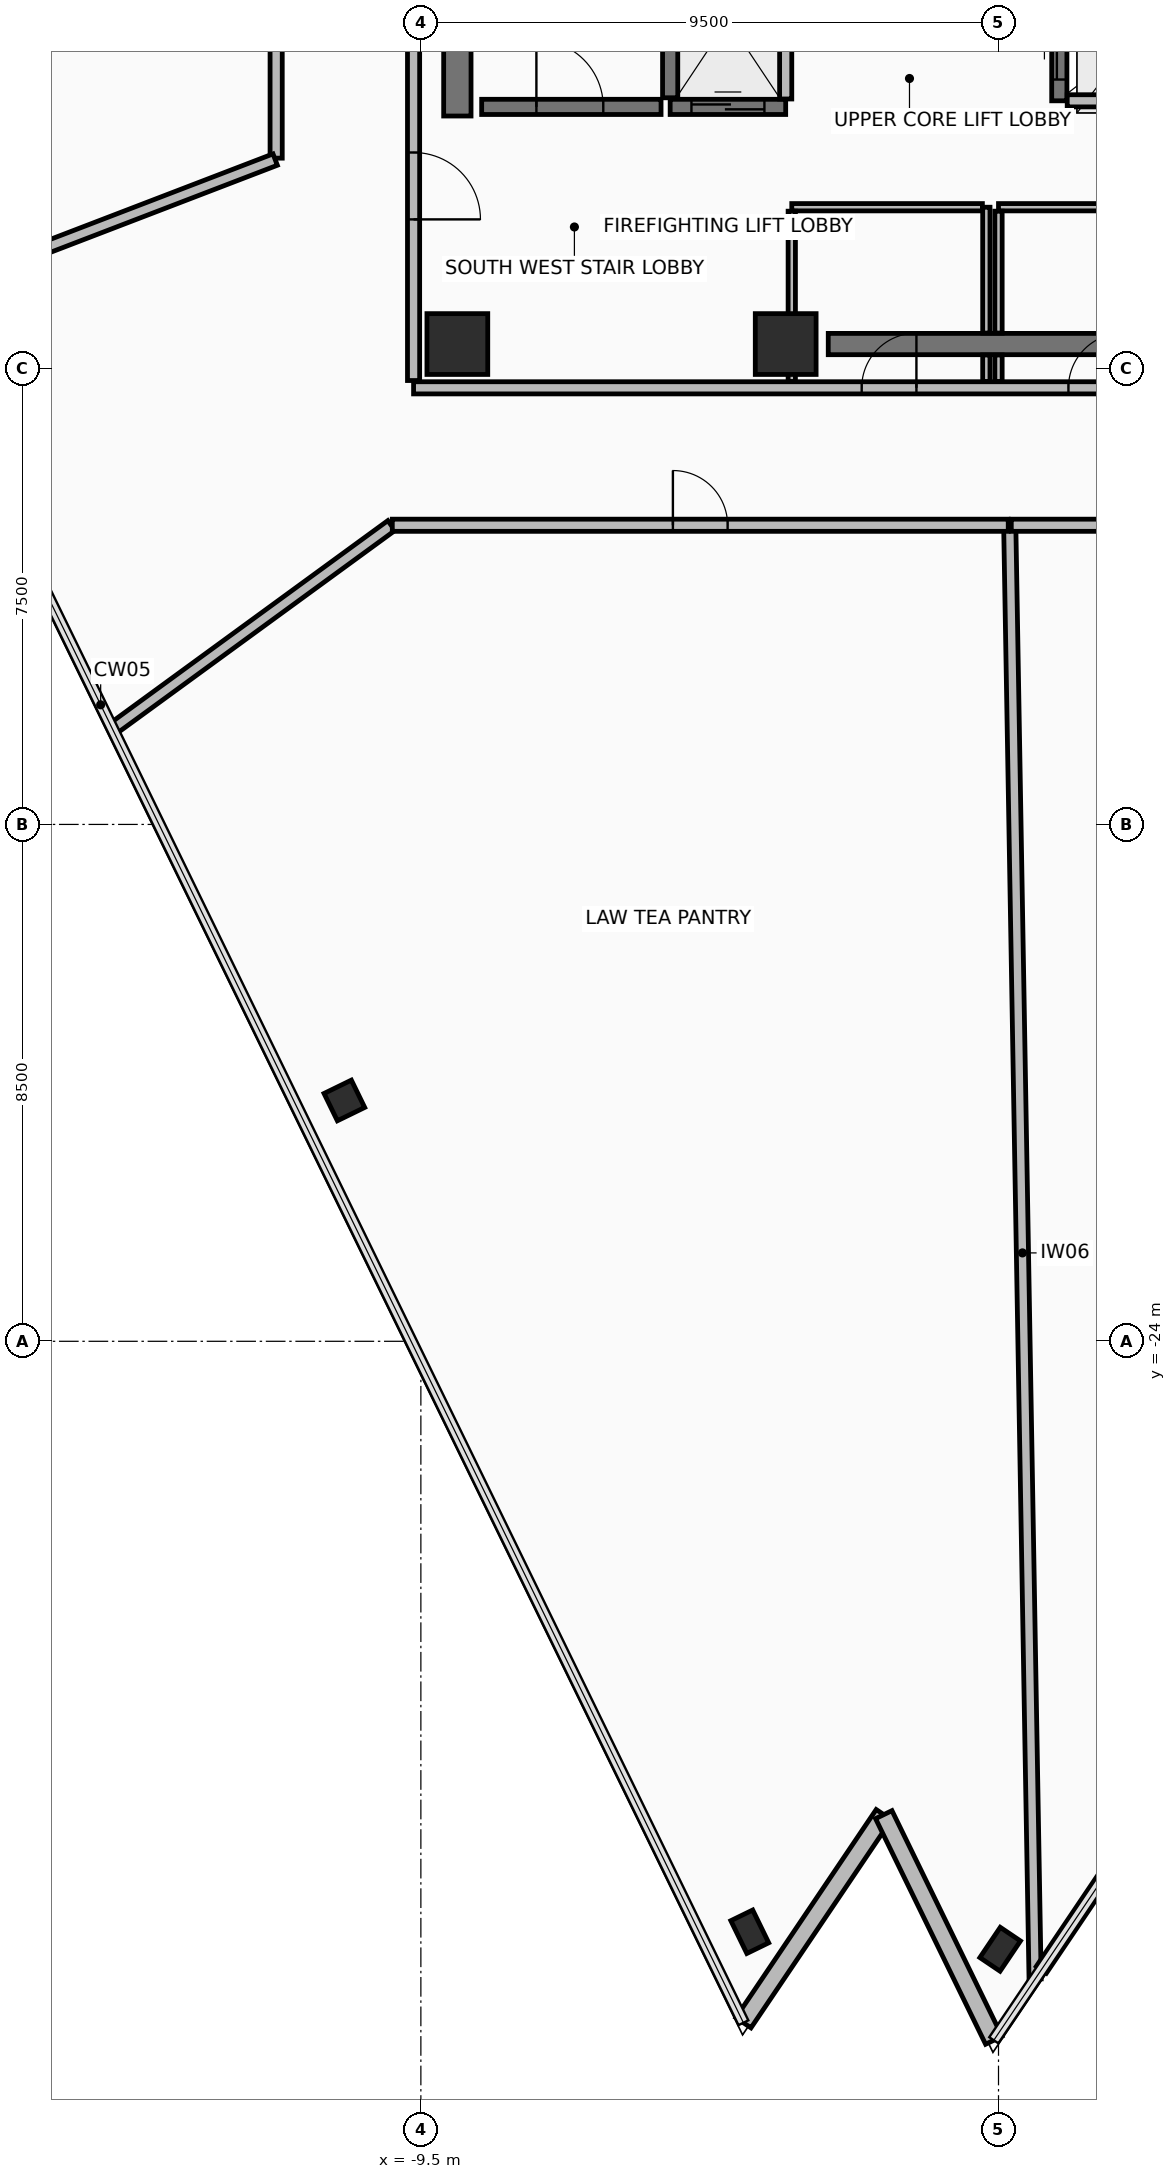
"""IFC4 building model, lengths in metres.
Left out: names, types, materials, properties, quantities, classifications, styles, units other than length and angle.
Written with IfcOpenShell. Run it as: python <this file> out.ifc"""

import sys

from ifc_helpers import new_model, si_unit, direction, frame, frame_2d, origin, origin_2d, place, context, subcontext, project, spatial, rectangle, hollow_rectangle, extrude, element, fill, save


model = new_model("IFC4")
c1 = context("Model", 3, precision=1e-05, world=origin(), true_north=direction((0.0, 1.0)))
c2 = subcontext(c1, "Body", "Model", "MODEL_VIEW")
j1 = project(units=[si_unit("LENGTHUNIT", "METRE"), si_unit("PLANEANGLEUNIT", "RADIAN")], contexts=[c1])
p1 = place(None, origin())
s1 = spatial("IfcSite", under=j1, at=p1, CompositionType="ELEMENT")
p2 = place(p1, origin())
s2 = spatial("IfcBuilding", under=s1, at=p2, CompositionType="ELEMENT")
p3 = place(p2, frame((0.0, 0.0, 241.45)))
s3 = spatial("IfcBuildingStorey", under=s2, at=p3, CompositionType="ELEMENT", Elevation=241.45)
for number, where, z_axis, x_axis in (
    (1, (-8.9, -7.6, 0.0), (0.0, 0.0, 1.0), (1.0, 0.0, 0.0)),
    (2, (-3.5, -7.6, 0.0), (0.0, 0.0, 1.0), (1.0, 0.0, 0.0)),
):
    element("IfcColumn", number, at=place(p3, frame(where, z_axis=z_axis, x_axis=x_axis)), inside=s3, PredefinedType="COLUMN", context=c2, shape_type="SweptSolid", body=[
        extrude(rectangle(XDim=1.0, YDim=1.0, at=origin_2d()), origin(), (0.0, 0.0, 1.0), 3.6),
    ])
p4 = place(p3, frame((-10.758, -20.039, 0.0), z_axis=(0.0, 0.0, 1.0), x_axis=(-0.438371146789, 0.898794046299, 0.0)))
e3 = element("IfcColumn", 3, at=p4, inside=s3, PredefinedType="COLUMN", context=c2, shape_type="SweptSolid", body=[
    extrude(hollow_rectangle(XDim=0.5, YDim=0.5, WallThickness=0.032, at=origin_2d()), origin(), (0.0, 0.0, 1.0), 3.6),
])
for number, where, z_axis, x_axis in (
    (4, (-4.091, -33.71, 0.0), (0.0, 0.0, 1.0), (-0.438, 0.899, 0.0)),
    (5, (0.027, -33.998, 0.0), (0.0, 0.0, 1.0), (0.559, 0.829, 0.0)),
):
    element("IfcColumn", number, at=place(p3, frame(where, z_axis=z_axis, x_axis=x_axis)), inside=s3, PredefinedType="COLUMN", context=c2, shape_type="SweptSolid", body=[
        extrude(hollow_rectangle(XDim=0.4, YDim=0.6, WallThickness=0.03, at=origin_2d()), origin(), (0.0, 0.0, 1.0), 3.6),
    ])
p5 = place(p3, frame((-4.195, -35.207, 0.0), z_axis=(0.0, 0.0, 1.0), x_axis=(0.559182319101, 0.829044711704, 0.0)))
e6 = element("IfcWall", 6, at=p5, inside=s3, PredefinedType="STANDARD", context=c2, shape_type="SweptSolid", body=[
    extrude(rectangle(XDim=4.128, YDim=0.3, at=frame_2d((2.064, 0.0))), origin(), (0.0, 0.0, 1.0), 2.765),
])
p6 = place(p3, frame((-1.887, -31.784, 0.0), z_axis=(0.0, 0.0, 1.0), x_axis=(0.438367699713, -0.898795727542, 0.0)))
e7 = element("IfcWall", 7, at=p6, inside=s3, PredefinedType="STANDARD", context=c2, shape_type="SweptSolid", body=[
    extrude(rectangle(XDim=4.128, YDim=0.3, at=frame_2d((2.064, 0.0))), origin(), (0.0, 0.0, 1.0), 2.765),
])
p7 = place(p3, frame((-2.8, -7.6, 0.0), z_axis=(0.0, 0.0, 1.0), x_axis=(1.0, 0.0, 0.0)))
e8 = element("IfcWall", 8, at=p7, inside=s3, PredefinedType="SHEAR", context=c2, shape_type="SweptSolid", body=[
    extrude(rectangle(XDim=5.38, YDim=0.35, at=frame_2d((2.69, 0.0))), origin(), (0.0, 0.0, 1.0), 3.42),
])
p8 = place(p3, frame((-8.9, -3.85, 0.0), z_axis=(0.0, 0.0, 1.0), x_axis=(0.0, 1.0, 0.0)))
e9 = element("IfcWall", 9, at=p8, inside=s3, PredefinedType="SHEAR", context=c2, shape_type="SweptSolid", body=[
    extrude(rectangle(XDim=10.7, YDim=0.45, at=frame_2d((5.35, 0.0))), origin(), (0.0, 0.0, 1.0), 3.42),
])
p9 = place(p3, frame((-9.62, -8.32, 0.0), z_axis=(0.0, 0.0, 1.0), x_axis=(1.0, 0.0, 0.0)))
e10 = element("IfcWall", 10, at=p9, inside=s3, PredefinedType="PARTITIONING", context=c2, shape_type="SweptSolid", body=[
    extrude(rectangle(XDim=19.24, YDim=0.2, at=frame_2d((9.62, 0.0))), origin(), (0.0, 0.0, 1.0), 2.915),
])
p10 = place(p9, frame((7.37, 0.0, 0.0)))
e11 = element("IfcOpeningElement", 11, at=p10, cuts=e10, PredefinedType="OPENING", context=c2, shape_type="SweptSolid", body=[
    extrude(rectangle(XDim=0.9, YDim=2.1, at=frame_2d((0.45, 1.05))), frame((0.0, 0.11, 0.0), z_axis=(0.0, -1.0, 0.0), x_axis=(1.0, 0.0, 0.0)), (0.0, 0.0, 1.0), 0.22),
])
p11 = place(p9, frame((10.77, 0.0, 0.0)))
e12 = element("IfcOpeningElement", 12, at=p11, cuts=e10, PredefinedType="OPENING", context=c2, shape_type="SweptSolid", body=[
    extrude(rectangle(XDim=0.9, YDim=2.1, at=frame_2d((0.45, 1.05))), frame((0.0, 0.11, 0.0), z_axis=(0.0, -1.0, 0.0), x_axis=(1.0, 0.0, 0.0)), (0.0, 0.0, 1.0), 0.22),
])
p12 = place(p3, frame((-9.62, 8.2, 0.0), z_axis=(0.0, 0.0, 1.0), x_axis=(0.0, -1.0, 0.0)))
e13 = element("IfcWall", 13, at=p12, inside=s3, PredefinedType="PARTITIONING", context=c2, shape_type="SweptSolid", body=[
    extrude(rectangle(XDim=16.4, YDim=0.2, at=frame_2d((8.2, 0.0))), origin(), (0.0, 0.0, 1.0), 2.765),
])
p13 = place(p12, frame((12.65, 0.0, 0.0)))
e14 = element("IfcOpeningElement", 14, at=p13, cuts=e13, PredefinedType="OPENING", context=c2, shape_type="SweptSolid", body=[
    extrude(rectangle(XDim=1.1, YDim=2.15, at=frame_2d((0.55, 1.075))), frame((0.0, 0.11, 0.0), z_axis=(0.0, -1.0, 0.0), x_axis=(1.0, 0.0, 0.0)), (0.0, 0.0, 1.0), 0.22),
])
p14 = place(p3, frame((-5.4, -3.55, 0.0), z_axis=(0.0, 0.0, 1.0), x_axis=(0.0, 1.0, 0.0)))
e15 = element("IfcWall", 15, at=p14, inside=s3, PredefinedType="SHEAR", context=c2, shape_type="SweptSolid", body=[
    extrude(rectangle(XDim=7.3, YDim=0.25, at=frame_2d((3.65, 0.0))), origin(), (0.0, 0.0, 1.0), 3.42),
])
p15 = place(p3, frame((-8.5, -3.7, 0.0), z_axis=(0.0, 0.0, 1.0), x_axis=(1.0, 0.0, 0.0)))
e16 = element("IfcWall", 16, at=p15, inside=s3, PredefinedType="SHEAR", context=c2, shape_type="SweptSolid", body=[
    extrude(rectangle(XDim=2.95, YDim=0.25, at=frame_2d((1.475, 0.0))), origin(), (0.0, 0.0, 1.0), 3.42),
])
p16 = place(p15, frame((0.9, 0.0, 0.0)))
e17 = element("IfcOpeningElement", 17, at=p16, cuts=e16, PredefinedType="OPENING", context=c2, shape_type="SweptSolid", body=[
    extrude(rectangle(XDim=1.1, YDim=2.15, at=frame_2d((0.55, 1.075))), frame((0.0, 0.135, 0.0), z_axis=(0.0, -1.0, 0.0), x_axis=(1.0, 0.0, 0.0)), (0.0, 0.0, 1.0), 0.27),
])
p17 = place(p3, frame((1.0, -3.6, 0.0), z_axis=(0.0, 0.0, 1.0), x_axis=(0.0, 1.0, 0.0)))
e18 = element("IfcWall", 18, at=p17, inside=s3, PredefinedType="SHEAR", context=c2, shape_type="SweptSolid", body=[
    extrude(rectangle(XDim=1.8, YDim=0.25, at=frame_2d((0.9, 0.0))), origin(), (0.0, 0.0, 1.0), 3.42),
])
p18 = place(p17, frame((0.35, 0.0, 0.0)))
e19 = element("IfcOpeningElement", 19, at=p18, cuts=e18, PredefinedType="OPENING", context=c2, shape_type="SweptSolid", body=[
    extrude(rectangle(XDim=1.1, YDim=2.2, at=frame_2d((0.55, 1.1))), frame((0.0, 0.135, 0.0), z_axis=(0.0, -1.0, 0.0), x_axis=(1.0, 0.0, 0.0)), (0.0, 0.0, 1.0), 0.27),
])
p19 = place(p3, frame((1.13, -3.6, 0.0), z_axis=(0.0, 0.0, 1.0), x_axis=(1.0, 0.0, 0.0)))
e20 = element("IfcWall", 20, at=p19, inside=s3, PredefinedType="PARTITIONING", context=c2, shape_type="SweptSolid", body=[
    extrude(rectangle(XDim=2.045, YDim=0.2, at=frame_2d((1.022, 0.0))), origin(), (0.0, 0.0, 1.0), 3.42),
])
p20 = place(p3, frame((-5.4, -3.7, 0.0), z_axis=(0.0, 0.0, 1.0), x_axis=(1.0, 0.0, 0.0)))
e21 = element("IfcWall", 21, at=p20, inside=s3, PredefinedType="SHEAR", context=c2, shape_type="SweptSolid", body=[
    extrude(rectangle(XDim=1.9, YDim=0.25, at=frame_2d((0.95, 0.0))), origin(), (0.0, 0.0, 1.0), 3.42),
])
p21 = place(p20, frame((0.35, 0.0, 0.0)))
e22 = element("IfcOpeningElement", 22, at=p21, cuts=e21, PredefinedType="OPENING", context=c2, shape_type="SweptSolid", body=[
    extrude(rectangle(XDim=1.2, YDim=2.2, at=frame_2d((0.6, 1.1))), frame((0.0, 0.135, 0.0), z_axis=(0.0, -1.0, 0.0), x_axis=(1.0, 0.0, 0.0)), (0.0, 0.0, 1.0), 0.27),
])
p22 = place(p3, frame((-3.5, -3.57, 0.0), z_axis=(0.0, 0.0, 1.0), x_axis=(0.0, 1.0, 0.0)))
e23 = element("IfcWall", 23, at=p22, inside=s3, PredefinedType="PARTITIONING", context=c2, shape_type="SweptSolid", body=[
    extrude(rectangle(XDim=2.615, YDim=0.2, at=frame_2d((1.308, 0.0))), origin(), (0.0, 0.0, 1.0), 3.42),
])
p23 = place(p3, frame((-0.2, -8.215, 0.0), z_axis=(0.0, 0.0, 1.0), x_axis=(0.0, 1.0, 0.0)))
e24 = element("IfcWall", 24, at=p23, inside=s3, PredefinedType="PARTITIONING", context=c2, shape_type="SweptSolid", body=[
    extrude(rectangle(XDim=0.435, YDim=0.12, at=frame_2d((0.218, 0.0))), origin(), (0.0, 0.0, 1.0), 2.715),
])
p24 = place(p3, frame((-0.2, -7.42, 0.0), z_axis=(0.0, 0.0, 1.0), x_axis=(0.0, 1.0, 0.0)))
e25 = element("IfcWall", 25, at=p24, inside=s3, PredefinedType="PARTITIONING", context=c2, shape_type="SweptSolid", body=[
    extrude(rectangle(XDim=2.07, YDim=0.12, at=frame_2d((1.035, 0.0))), origin(), (0.0, 0.0, 1.0), 2.715),
])
p25 = place(p3, frame((-0.265, -5.35, 0.0), z_axis=(0.0, 0.0, 1.0), x_axis=(-1.0, 0.0, 0.0)))
e26 = element("IfcWall", 26, at=p25, inside=s3, PredefinedType="PARTITIONING", context=c2, shape_type="SweptSolid", body=[
    extrude(rectangle(XDim=3.135, YDim=0.12, at=frame_2d((1.567, 0.0))), origin(), (0.0, 0.0, 1.0), 2.715),
])
p26 = place(p3, frame((-3.4, -5.415, 0.0), z_axis=(0.0, 0.0, 1.0), x_axis=(0.0, -1.0, 0.0)))
e27 = element("IfcWall", 27, at=p26, inside=s3, PredefinedType="PARTITIONING", context=c2, shape_type="SweptSolid", body=[
    extrude(rectangle(XDim=2.8, YDim=0.12, at=frame_2d((1.4, 0.0))), origin(), (0.0, 0.0, 1.0), 2.715),
])
p27 = place(p3, frame((3.135, -5.35, 0.0), z_axis=(0.0, 0.0, 1.0), x_axis=(-1.0, 0.0, 0.0)))
e28 = element("IfcWall", 28, at=p27, inside=s3, PredefinedType="PARTITIONING", context=c2, shape_type="SweptSolid", body=[
    extrude(rectangle(XDim=3.135, YDim=0.12, at=frame_2d((1.567, 0.0))), origin(), (0.0, 0.0, 1.0), 3.42),
])
p28 = place(p3, frame((0.0, -5.415, 0.0), z_axis=(0.0, 0.0, 1.0), x_axis=(0.0, -1.0, 0.0)))
e29 = element("IfcWall", 29, at=p28, inside=s3, PredefinedType="PARTITIONING", context=c2, shape_type="SweptSolid", body=[
    extrude(rectangle(XDim=2.005, YDim=0.12, at=frame_2d((1.002, 0.0))), origin(), (0.0, 0.0, 1.0), 2.715),
])
p29 = place(p3, frame((0.0, -7.78, 0.0), z_axis=(0.0, 0.0, 1.0), x_axis=(0.0, -1.0, 0.0)))
e30 = element("IfcWall", 30, at=p29, inside=s3, PredefinedType="PARTITIONING", context=c2, shape_type="SweptSolid", body=[
    extrude(rectangle(XDim=0.435, YDim=0.12, at=frame_2d((0.218, 0.0))), origin(), (0.0, 0.0, 1.0), 2.715),
])
p30 = place(p3, frame((0.602, -34.487, 0.0), z_axis=(0.0, 0.0, 1.0), x_axis=(-0.017457980956, 0.999847597837, 0.0)))
e31 = element("IfcWall", 31, at=p30, inside=s3, PredefinedType="PARTITIONING", context=c2, shape_type="SweptSolid", body=[
    extrude(rectangle(XDim=23.885, YDim=0.2, at=frame_2d((11.943, 0.0))), origin(), (0.0, 0.0, 1.0), 2.765),
])
p31 = place(p3, frame((0.21, -10.58, 0.0), z_axis=(0.0, 0.0, 1.0), x_axis=(1.0, 0.0, 0.0)))
e32 = element("IfcWall", 32, at=p31, inside=s3, PredefinedType="PARTITIONING", context=c2, shape_type="SweptSolid", body=[
    extrude(rectangle(XDim=9.76, YDim=0.2, at=frame_2d((4.88, 0.0))), origin(), (0.0, 0.0, 1.0), 2.915),
])
p32 = place(p31, frame((4.455, 0.0, 0.0)))
e33 = element("IfcOpeningElement", 33, at=p32, cuts=e32, PredefinedType="OPENING", context=c2, shape_type="SweptSolid", body=[
    extrude(rectangle(XDim=0.85, YDim=2.1, at=frame_2d((0.425, 1.05))), frame((0.0, 0.11, 0.0), z_axis=(0.0, -1.0, 0.0), x_axis=(1.0, 0.0, 0.0)), (0.0, 0.0, 1.0), 0.22),
])
p33 = place(p3, frame((14.491, -13.896, 0.0), z_axis=(0.0, 0.0, 1.0), x_axis=(-0.559191528364, -0.829038500074, 0.0)))
e34 = element("IfcWall", 34, at=p33, inside=s3, PredefinedType="PARTITIONING", context=c2, shape_type="SweptSolid", body=[
    extrude(rectangle(XDim=24.655, YDim=0.2, at=frame_2d((12.328, 0.0))), origin(), (0.0, 0.0, 1.0), 3.42),
])
p34 = place(p3, frame((-11.88, 10.579, 0.0), z_axis=(0.0, 0.0, 1.0), x_axis=(0.0, -1.0, 0.0)))
e35 = element("IfcWall", 35, at=p34, inside=s3, PredefinedType="PARTITIONING", context=c2, shape_type="SweptSolid", body=[
    extrude(rectangle(XDim=15.123, YDim=0.2, at=frame_2d((7.561, 0.0))), origin(), (0.0, 0.0, 1.0), 2.765),
])
p35 = place(p34, frame((7.061, 0.0, 0.0)))
e36 = element("IfcOpeningElement", 36, at=p35, cuts=e35, PredefinedType="OPENING", context=c2, shape_type="SweptSolid", body=[
    extrude(rectangle(XDim=1.0, YDim=2.15, at=frame_2d((0.5, 1.075))), frame((0.0, 0.11, 0.0), z_axis=(0.0, -1.0, 0.0), x_axis=(1.0, 0.0, 0.0)), (0.0, 0.0, 1.0), 0.22),
])
p36 = place(p3, frame((-11.896, -4.566, 0.0), z_axis=(0.0, 0.0, 1.0), x_axis=(-0.933585017774, -0.358355988632, 0.0)))
e37 = element("IfcWall", 37, at=p36, inside=s3, PredefinedType="PARTITIONING", context=c2, shape_type="SweptSolid", body=[
    extrude(rectangle(XDim=6.512, YDim=0.2, at=frame_2d((3.256, 0.0))), origin(), (0.0, 0.0, 1.0), 2.765),
])
p37 = place(p3, frame((-14.572, -13.931, 0.0), z_axis=(0.0, 0.0, 1.0), x_axis=(0.807835213642, 0.589408404759, 0.0)))
e38 = element("IfcWall", 38, at=p37, inside=s3, PredefinedType="PARTITIONING", context=c2, shape_type="SweptSolid", body=[
    extrude(rectangle(XDim=5.678, YDim=0.2, at=frame_2d((2.839, 0.0))), origin(), (0.0, 0.0, 1.0), 2.765),
])
p38 = place(p3, frame((-9.97, -10.58, 0.0), z_axis=(0.0, 0.0, 1.0), x_axis=(1.0, 0.0, 0.0)))
e39 = element("IfcWall", 39, at=p38, inside=s3, PredefinedType="PARTITIONING", context=c2, shape_type="SweptSolid", body=[
    extrude(rectangle(XDim=10.13, YDim=0.2, at=frame_2d((5.065, 0.0))), origin(), (0.0, 0.0, 1.0), 2.915),
])
p39 = place(p38, frame((4.615, 0.0, 0.0)))
e40 = element("IfcOpeningElement", 40, at=p39, cuts=e39, PredefinedType="OPENING", context=c2, shape_type="SweptSolid", body=[
    extrude(rectangle(XDim=0.9, YDim=2.1, at=frame_2d((0.45, 1.05))), frame((0.0, 0.11, 0.0), z_axis=(0.0, -1.0, 0.0), x_axis=(1.0, 0.0, 0.0)), (0.0, 0.0, 1.0), 0.22),
])
p40 = place(p13, frame((1.1, 0.0, 0.0), z_axis=(0.0, 0.0, 1.0), x_axis=(-1.0, 0.0, 0.0)))
e41 = element("IfcDoor", 41, at=p40, inside=s3, OperationType="SINGLE_SWING_LEFT", PredefinedType="DOOR", context=c2, shape_type="SweptSolid", body=[
    extrude(rectangle(XDim=1.1, YDim=2.15, at=frame_2d((0.55, 1.075))), frame((0.0, 0.025, 0.0), z_axis=(0.0, -1.0, 0.0), x_axis=(1.0, 0.0, 0.0)), (0.0, 0.0, 1.0), 0.05),
])
fill(e14, e41)
p41 = place(p16, origin())
e42 = element("IfcDoor", 42, at=p41, inside=s3, OperationType="SINGLE_SWING_LEFT", PredefinedType="DOOR", context=c2, shape_type="SweptSolid", body=[
    extrude(rectangle(XDim=1.1, YDim=2.15, at=frame_2d((0.55, 1.075))), frame((0.0, 0.025, 0.0), z_axis=(0.0, -1.0, 0.0), x_axis=(1.0, 0.0, 0.0)), (0.0, 0.0, 1.0), 0.05),
])
fill(e17, e42)
p42 = place(p18, origin())
e43 = element("IfcDoor", 43, at=p42, inside=s3, OperationType="SLIDING_TO_LEFT", PredefinedType="DOOR", context=c2, shape_type="SweptSolid", body=[
    extrude(rectangle(XDim=1.1, YDim=2.2, at=frame_2d((0.55, 1.1))), frame((0.0, 0.025, 0.0), z_axis=(0.0, -1.0, 0.0), x_axis=(1.0, 0.0, 0.0)), (0.0, 0.0, 1.0), 0.05),
])
fill(e19, e43)
p43 = place(p21, origin())
e44 = element("IfcDoor", 44, at=p43, inside=s3, OperationType="SLIDING_TO_RIGHT", PredefinedType="DOOR", context=c2, shape_type="SweptSolid", body=[
    extrude(rectangle(XDim=1.2, YDim=2.2, at=frame_2d((0.6, 1.1))), frame((0.0, 0.025, 0.0), z_axis=(0.0, -1.0, 0.0), x_axis=(1.0, 0.0, 0.0)), (0.0, 0.0, 1.0), 0.05),
])
fill(e22, e44)
p44 = place(p10, frame((0.9, 0.0, 0.0), z_axis=(0.0, 0.0, 1.0), x_axis=(-1.0, 0.0, 0.0)))
e45 = element("IfcDoor", 45, at=p44, inside=s3, OperationType="SINGLE_SWING_LEFT", PredefinedType="DOOR", context=c2, shape_type="SweptSolid", body=[
    extrude(rectangle(XDim=0.9, YDim=2.1, at=frame_2d((0.45, 1.05))), frame((0.0, 0.025, 0.0), z_axis=(0.0, -1.0, 0.0), x_axis=(1.0, 0.0, 0.0)), (0.0, 0.0, 1.0), 0.05),
])
fill(e11, e45)
p45 = place(p11, frame((0.9, 0.0, 0.0), z_axis=(0.0, 0.0, 1.0), x_axis=(-1.0, 0.0, 0.0)))
e46 = element("IfcDoor", 46, at=p45, inside=s3, OperationType="SINGLE_SWING_LEFT", PredefinedType="DOOR", context=c2, shape_type="SweptSolid", body=[
    extrude(rectangle(XDim=0.9, YDim=2.1, at=frame_2d((0.45, 1.05))), frame((0.0, 0.025, 0.0), z_axis=(0.0, -1.0, 0.0), x_axis=(1.0, 0.0, 0.0)), (0.0, 0.0, 1.0), 0.05),
])
fill(e12, e46)
p46 = place(p39, origin())
e47 = element("IfcDoor", 47, at=p46, inside=s3, OperationType="SINGLE_SWING_LEFT", PredefinedType="DOOR", context=c2, shape_type="SweptSolid", body=[
    extrude(rectangle(XDim=0.9, YDim=2.1, at=frame_2d((0.45, 1.05))), frame((0.0, 0.025, 0.0), z_axis=(0.0, -1.0, 0.0), x_axis=(1.0, 0.0, 0.0)), (0.0, 0.0, 1.0), 0.05),
])
fill(e40, e47)
save(model, sys.argv[1])
